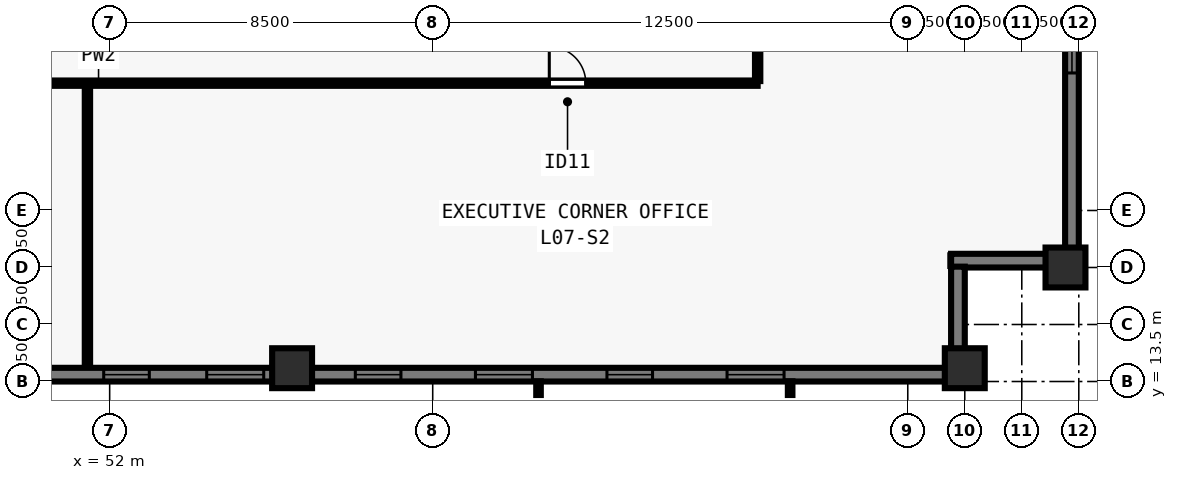
"""IFC4 building model, lengths in metres.
Left out: names, types, materials, properties, quantities, classifications, styles, units other than length and angle.
Written with IfcOpenShell. Run it as: python <this file> out.ifc"""

import sys

from ifc_helpers import new_model, si_unit, direction, frame, frame_2d, origin, origin_2d, place, context, subcontext, project, spatial, rectangle, extrude, element, fill, save


model = new_model("IFC4")
c1 = context("Model", 3, precision=1e-05, world=origin(), true_north=direction((0.0, 1.0)))
c2 = subcontext(c1, "Body", "Model", "MODEL_VIEW")
j1 = project(units=[si_unit("LENGTHUNIT", "METRE"), si_unit("PLANEANGLEUNIT", "RADIAN")], contexts=[c1])
p1 = place(None, origin())
s1 = spatial("IfcSite", under=j1, at=p1, CompositionType="ELEMENT")
p2 = place(p1, origin())
s2 = spatial("IfcBuilding", under=s1, at=p2, CompositionType="ELEMENT")
p3 = place(p2, frame((0.0, 0.0, 30.5)))
s3 = spatial("IfcBuildingStorey", under=s2, at=p3, CompositionType="ELEMENT", Elevation=30.5)
for number, where, z_axis, x_axis in (
    (1, (56.8, 13.85, 0.0), (0.0, 0.0, 1.0), (1.0, 0.0, 0.0)),
    (2, (74.5, 13.85, 0.0), (0.0, 0.0, 1.0), (1.0, 0.0, 0.0)),
    (3, (77.15, 16.5, 0.0), (0.0, 0.0, 1.0), (0.0, 1.0, 0.0)),
):
    element("IfcColumn", number, at=place(p3, frame(where, z_axis=z_axis, x_axis=x_axis)), inside=s3, PredefinedType="COLUMN", context=c2, shape_type="SweptSolid", body=[
        extrude(rectangle(XDim=1.05, YDim=1.05, at=origin_2d()), origin(), (0.0, 0.0, 1.0), 3.5),
    ])
p4 = place(p3, frame((77.32, 61.5, 0.0), z_axis=(0.0, 0.0, 1.0), x_axis=(0.0, -1.0, 0.0)))
e4 = element("IfcWall", 4, at=p4, inside=s3, PredefinedType="SOLIDWALL", context=c2, shape_type="SweptSolid", body=[
    extrude(rectangle(XDim=44.662, YDim=0.36, at=frame_2d((22.331, 0.0))), origin(), (0.0, 0.0, 1.0), 3.28),
])
p5 = place(p4, frame((4.78, 0.0, 0.8)))
e5 = element("IfcOpeningElement", 5, at=p5, cuts=e4, PredefinedType="OPENING", context=c2, shape_type="SweptSolid", body=[
    extrude(rectangle(XDim=1.5, YDim=1.544, at=frame_2d((0.75, 0.772))), frame((0.0, 0.19, 0.0), z_axis=(0.0, -1.0, 0.0), x_axis=(1.0, 0.0, 0.0)), (0.0, 0.0, 1.0), 0.38),
])
p6 = place(p4, frame((8.29, 0.0, 0.8)))
e6 = element("IfcOpeningElement", 6, at=p6, cuts=e4, PredefinedType="OPENING", context=c2, shape_type="SweptSolid", body=[
    extrude(rectangle(XDim=1.2, YDim=1.544, at=frame_2d((0.6, 0.772))), frame((0.0, 0.19, 0.0), z_axis=(0.0, -1.0, 0.0), x_axis=(1.0, 0.0, 0.0)), (0.0, 0.0, 1.0), 0.38),
])
p7 = place(p4, frame((11.5, 0.0, 0.8)))
e7 = element("IfcOpeningElement", 7, at=p7, cuts=e4, PredefinedType="OPENING", context=c2, shape_type="SweptSolid", body=[
    extrude(rectangle(XDim=1.5, YDim=1.544, at=frame_2d((0.75, 0.772))), frame((0.0, 0.19, 0.0), z_axis=(0.0, -1.0, 0.0), x_axis=(1.0, 0.0, 0.0)), (0.0, 0.0, 1.0), 0.38),
])
p8 = place(p4, frame((15.01, 0.0, 0.8)))
e8 = element("IfcOpeningElement", 8, at=p8, cuts=e4, PredefinedType="OPENING", context=c2, shape_type="SweptSolid", body=[
    extrude(rectangle(XDim=1.2, YDim=1.544, at=frame_2d((0.6, 0.772))), frame((0.0, 0.19, 0.0), z_axis=(0.0, -1.0, 0.0), x_axis=(1.0, 0.0, 0.0)), (0.0, 0.0, 1.0), 0.38),
])
p9 = place(p4, frame((18.671, 0.0, 0.8)))
e9 = element("IfcOpeningElement", 9, at=p9, cuts=e4, PredefinedType="OPENING", context=c2, shape_type="SweptSolid", body=[
    extrude(rectangle(XDim=1.5, YDim=1.544, at=frame_2d((0.75, 0.772))), frame((0.0, 0.19, 0.0), z_axis=(0.0, -1.0, 0.0), x_axis=(1.0, 0.0, 0.0)), (0.0, 0.0, 1.0), 0.38),
])
p10 = place(p4, frame((22.581, 0.0, 0.8)))
e10 = element("IfcOpeningElement", 10, at=p10, cuts=e4, PredefinedType="OPENING", context=c2, shape_type="SweptSolid", body=[
    extrude(rectangle(XDim=1.2, YDim=1.544, at=frame_2d((0.6, 0.772))), frame((0.0, 0.19, 0.0), z_axis=(0.0, -1.0, 0.0), x_axis=(1.0, 0.0, 0.0)), (0.0, 0.0, 1.0), 0.38),
])
p11 = place(p4, frame((24.941, 0.0, 0.8)))
e11 = element("IfcOpeningElement", 11, at=p11, cuts=e4, PredefinedType="OPENING", context=c2, shape_type="SweptSolid", body=[
    extrude(rectangle(XDim=1.5, YDim=1.544, at=frame_2d((0.75, 0.772))), frame((0.0, 0.19, 0.0), z_axis=(0.0, -1.0, 0.0), x_axis=(1.0, 0.0, 0.0)), (0.0, 0.0, 1.0), 0.38),
])
p12 = place(p4, frame((28.451, 0.0, 0.8)))
e12 = element("IfcOpeningElement", 12, at=p12, cuts=e4, PredefinedType="OPENING", context=c2, shape_type="SweptSolid", body=[
    extrude(rectangle(XDim=1.2, YDim=1.544, at=frame_2d((0.6, 0.772))), frame((0.0, 0.19, 0.0), z_axis=(0.0, -1.0, 0.0), x_axis=(1.0, 0.0, 0.0)), (0.0, 0.0, 1.0), 0.38),
])
p13 = place(p4, frame((31.662, 0.0, 0.8)))
e13 = element("IfcOpeningElement", 13, at=p13, cuts=e4, PredefinedType="OPENING", context=c2, shape_type="SweptSolid", body=[
    extrude(rectangle(XDim=1.5, YDim=1.544, at=frame_2d((0.75, 0.772))), frame((0.0, 0.19, 0.0), z_axis=(0.0, -1.0, 0.0), x_axis=(1.0, 0.0, 0.0)), (0.0, 0.0, 1.0), 0.38),
])
p14 = place(p4, frame((35.172, 0.0, 0.8)))
e14 = element("IfcOpeningElement", 14, at=p14, cuts=e4, PredefinedType="OPENING", context=c2, shape_type="SweptSolid", body=[
    extrude(rectangle(XDim=1.2, YDim=1.544, at=frame_2d((0.6, 0.772))), frame((0.0, 0.19, 0.0), z_axis=(0.0, -1.0, 0.0), x_axis=(1.0, 0.0, 0.0)), (0.0, 0.0, 1.0), 0.38),
])
p15 = place(p4, frame((38.382, 0.0, 0.8)))
e15 = element("IfcOpeningElement", 15, at=p15, cuts=e4, PredefinedType="OPENING", context=c2, shape_type="SweptSolid", body=[
    extrude(rectangle(XDim=1.5, YDim=1.544, at=frame_2d((0.75, 0.772))), frame((0.0, 0.19, 0.0), z_axis=(0.0, -1.0, 0.0), x_axis=(1.0, 0.0, 0.0)), (0.0, 0.0, 1.0), 0.38),
])
p16 = place(p3, frame((77.5, 16.68, 0.0), z_axis=(0.0, 0.0, 1.0), x_axis=(-1.0, 0.0, 0.0)))
e16 = element("IfcWall", 16, at=p16, inside=s3, PredefinedType="SOLIDWALL", context=c2, shape_type="SweptSolid", body=[
    extrude(rectangle(XDim=3.36, YDim=0.36, at=frame_2d((1.68, 0.0))), origin(), (0.0, 0.0, 1.0), 3.28),
])
p17 = place(p3, frame((74.32, 16.522, 0.0), z_axis=(0.0, 0.0, 1.0), x_axis=(0.0, -1.0, 0.0)))
e17 = element("IfcWall", 17, at=p17, inside=s3, PredefinedType="SOLIDWALL", context=c2, shape_type="SweptSolid", body=[
    extrude(rectangle(XDim=2.684, YDim=0.36, at=frame_2d((1.342, 0.0))), origin(), (0.0, 0.0, 1.0), 3.28),
])
p18 = place(p3, frame((74.5, 13.68, 0.0), z_axis=(0.0, 0.0, 1.0), x_axis=(-1.0, 0.0, 0.0)))
e18 = element("IfcWall", 18, at=p18, inside=s3, PredefinedType="SOLIDWALL", context=c2, shape_type="SweptSolid", body=[
    extrude(rectangle(XDim=27.562, YDim=0.36, at=frame_2d((13.781, 0.0))), origin(), (0.0, 0.0, 1.0), 3.28),
])
p19 = place(p18, frame((4.755, 0.0, 0.8)))
e19 = element("IfcOpeningElement", 19, at=p19, cuts=e18, PredefinedType="OPENING", context=c2, shape_type="SweptSolid", body=[
    extrude(rectangle(XDim=1.5, YDim=1.544, at=frame_2d((0.75, 0.772))), frame((0.0, 0.19, 0.0), z_axis=(0.0, -1.0, 0.0), x_axis=(1.0, 0.0, 0.0)), (0.0, 0.0, 1.0), 0.38),
])
p20 = place(p18, frame((8.216, 0.0, 0.8)))
e20 = element("IfcOpeningElement", 20, at=p20, cuts=e18, PredefinedType="OPENING", context=c2, shape_type="SweptSolid", body=[
    extrude(rectangle(XDim=1.2, YDim=1.544, at=frame_2d((0.6, 0.772))), frame((0.0, 0.19, 0.0), z_axis=(0.0, -1.0, 0.0), x_axis=(1.0, 0.0, 0.0)), (0.0, 0.0, 1.0), 0.38),
])
p21 = place(p18, frame((11.376, 0.0, 0.8)))
e21 = element("IfcOpeningElement", 21, at=p21, cuts=e18, PredefinedType="OPENING", context=c2, shape_type="SweptSolid", body=[
    extrude(rectangle(XDim=1.5, YDim=1.544, at=frame_2d((0.75, 0.772))), frame((0.0, 0.19, 0.0), z_axis=(0.0, -1.0, 0.0), x_axis=(1.0, 0.0, 0.0)), (0.0, 0.0, 1.0), 0.38),
])
p22 = place(p18, frame((14.836, 0.0, 0.8)))
e22 = element("IfcOpeningElement", 22, at=p22, cuts=e18, PredefinedType="OPENING", context=c2, shape_type="SweptSolid", body=[
    extrude(rectangle(XDim=1.2, YDim=1.544, at=frame_2d((0.6, 0.772))), frame((0.0, 0.19, 0.0), z_axis=(0.0, -1.0, 0.0), x_axis=(1.0, 0.0, 0.0)), (0.0, 0.0, 1.0), 0.38),
])
p23 = place(p18, frame((18.447, 0.0, 0.8)))
e23 = element("IfcOpeningElement", 23, at=p23, cuts=e18, PredefinedType="OPENING", context=c2, shape_type="SweptSolid", body=[
    extrude(rectangle(XDim=1.5, YDim=1.544, at=frame_2d((0.75, 0.772))), frame((0.0, 0.19, 0.0), z_axis=(0.0, -1.0, 0.0), x_axis=(1.0, 0.0, 0.0)), (0.0, 0.0, 1.0), 0.38),
])
p24 = place(p18, frame((21.457, 0.0, 0.8)))
e24 = element("IfcOpeningElement", 24, at=p24, cuts=e18, PredefinedType="OPENING", context=c2, shape_type="SweptSolid", body=[
    extrude(rectangle(XDim=1.2, YDim=1.544, at=frame_2d((0.6, 0.772))), frame((0.0, 0.19, 0.0), z_axis=(0.0, -1.0, 0.0), x_axis=(1.0, 0.0, 0.0)), (0.0, 0.0, 1.0), 0.38),
])
p25 = place(p3, frame((34.95, 21.35, 0.0), z_axis=(0.0, 0.0, 1.0), x_axis=(1.0, 0.0, 0.0)))
e25 = element("IfcWall", 25, at=p25, inside=s3, PredefinedType="PARTITIONING", context=c2, shape_type="SweptSolid", body=[
    extrude(rectangle(XDim=34.1, YDim=0.14, at=frame_2d((17.05, 0.0))), origin(), (0.0, 0.0, 1.0), 3.28),
])
p26 = place(p25, frame((3.938, 0.0, 0.0)))
e26 = element("IfcOpeningElement", 26, at=p26, cuts=e25, PredefinedType="OPENING", context=c2, shape_type="SweptSolid", body=[
    extrude(rectangle(XDim=0.96, YDim=2.12, at=frame_2d((0.48, 1.06))), frame((0.0, 0.08, 0.0), z_axis=(0.0, -1.0, 0.0), x_axis=(1.0, 0.0, 0.0)), (0.0, 0.0, 1.0), 0.16),
])
p27 = place(p25, frame((28.617, 0.0, 0.0)))
e27 = element("IfcOpeningElement", 27, at=p27, cuts=e25, PredefinedType="OPENING", context=c2, shape_type="SweptSolid", body=[
    extrude(rectangle(XDim=0.96, YDim=2.12, at=frame_2d((0.48, 1.06))), frame((0.0, 0.08, 0.0), z_axis=(0.0, -1.0, 0.0), x_axis=(1.0, 0.0, 0.0)), (0.0, 0.0, 1.0), 0.16),
])
p28 = place(p3, frame((69.05, 21.405, 0.0), z_axis=(0.0, 0.0, 1.0), x_axis=(0.0, 1.0, 0.0)))
e28 = element("IfcWall", 28, at=p28, inside=s3, PredefinedType="PARTITIONING", context=c2, shape_type="SweptSolid", body=[
    extrude(rectangle(XDim=35.19, YDim=0.14, at=frame_2d((17.595, 0.0))), origin(), (0.0, 0.0, 1.0), 3.28),
])
p29 = place(p28, frame((8.545, 0.0, 0.0)))
e29 = element("IfcOpeningElement", 29, at=p29, cuts=e28, PredefinedType="OPENING", context=c2, shape_type="SweptSolid", body=[
    extrude(rectangle(XDim=0.96, YDim=2.12, at=frame_2d((0.48, 1.06))), frame((0.0, 0.08, 0.0), z_axis=(0.0, -1.0, 0.0), x_axis=(1.0, 0.0, 0.0)), (0.0, 0.0, 1.0), 0.16),
])
p30 = place(p28, frame((26.095, 0.0, 0.0)))
e30 = element("IfcOpeningElement", 30, at=p30, cuts=e28, PredefinedType="OPENING", context=c2, shape_type="SweptSolid", body=[
    extrude(rectangle(XDim=0.96, YDim=2.12, at=frame_2d((0.48, 1.06))), frame((0.0, 0.08, 0.0), z_axis=(0.0, -1.0, 0.0), x_axis=(1.0, 0.0, 0.0)), (0.0, 0.0, 1.0), 0.16),
])
p31 = place(p3, frame((51.415, 13.92, 0.0), z_axis=(0.0, 0.0, 1.0), x_axis=(0.0, 1.0, 0.0)))
e31 = element("IfcWall", 31, at=p31, inside=s3, PredefinedType="PARTITIONING", context=c2, shape_type="SweptSolid", body=[
    extrude(rectangle(XDim=7.33, YDim=0.14, at=frame_2d((3.665, 0.0))), origin(), (0.0, 0.0, 1.0), 2.849),
])
p32 = place(p15, origin())
e32 = element("IfcWindow", 32, at=p32, inside=s3, PartitioningType="SINGLE_PANEL", PredefinedType="WINDOW", context=c2, shape_type="SweptSolid", body=[
    extrude(rectangle(XDim=1.5, YDim=1.544, at=frame_2d((0.75, 0.772))), frame((0.0, -0.05, 0.0), z_axis=(0.0, -1.0, 0.0), x_axis=(1.0, 0.0, 0.0)), (0.0, 0.0, 1.0), 0.06),
])
fill(e15, e32)
p33 = place(p19, origin())
e33 = element("IfcWindow", 33, at=p33, inside=s3, PartitioningType="SINGLE_PANEL", PredefinedType="WINDOW", context=c2, shape_type="SweptSolid", body=[
    extrude(rectangle(XDim=1.5, YDim=1.544, at=frame_2d((0.75, 0.772))), frame((0.0, -0.05, 0.0), z_axis=(0.0, -1.0, 0.0), x_axis=(1.0, 0.0, 0.0)), (0.0, 0.0, 1.0), 0.06),
])
fill(e19, e33)
p34 = place(p20, origin())
e34 = element("IfcWindow", 34, at=p34, inside=s3, PartitioningType="SINGLE_PANEL", PredefinedType="WINDOW", context=c2, shape_type="SweptSolid", body=[
    extrude(rectangle(XDim=1.2, YDim=1.544, at=frame_2d((0.6, 0.772))), frame((0.0, -0.05, 0.0), z_axis=(0.0, -1.0, 0.0), x_axis=(1.0, 0.0, 0.0)), (0.0, 0.0, 1.0), 0.06),
])
fill(e20, e34)
p35 = place(p21, origin())
e35 = element("IfcWindow", 35, at=p35, inside=s3, PartitioningType="SINGLE_PANEL", PredefinedType="WINDOW", context=c2, shape_type="SweptSolid", body=[
    extrude(rectangle(XDim=1.5, YDim=1.544, at=frame_2d((0.75, 0.772))), frame((0.0, -0.05, 0.0), z_axis=(0.0, -1.0, 0.0), x_axis=(1.0, 0.0, 0.0)), (0.0, 0.0, 1.0), 0.06),
])
fill(e21, e35)
p36 = place(p22, origin())
e36 = element("IfcWindow", 36, at=p36, inside=s3, PartitioningType="SINGLE_PANEL", PredefinedType="WINDOW", context=c2, shape_type="SweptSolid", body=[
    extrude(rectangle(XDim=1.2, YDim=1.544, at=frame_2d((0.6, 0.772))), frame((0.0, -0.05, 0.0), z_axis=(0.0, -1.0, 0.0), x_axis=(1.0, 0.0, 0.0)), (0.0, 0.0, 1.0), 0.06),
])
fill(e22, e36)
p37 = place(p23, origin())
e37 = element("IfcWindow", 37, at=p37, inside=s3, PartitioningType="SINGLE_PANEL", PredefinedType="WINDOW", context=c2, shape_type="SweptSolid", body=[
    extrude(rectangle(XDim=1.5, YDim=1.544, at=frame_2d((0.75, 0.772))), frame((0.0, -0.05, 0.0), z_axis=(0.0, -1.0, 0.0), x_axis=(1.0, 0.0, 0.0)), (0.0, 0.0, 1.0), 0.06),
])
fill(e23, e37)
p38 = place(p24, origin())
e38 = element("IfcWindow", 38, at=p38, inside=s3, PartitioningType="SINGLE_PANEL", PredefinedType="WINDOW", context=c2, shape_type="SweptSolid", body=[
    extrude(rectangle(XDim=1.2, YDim=1.544, at=frame_2d((0.6, 0.772))), frame((0.0, -0.05, 0.0), z_axis=(0.0, -1.0, 0.0), x_axis=(1.0, 0.0, 0.0)), (0.0, 0.0, 1.0), 0.06),
])
fill(e24, e38)
p39 = place(p27, origin())
e39 = element("IfcDoor", 39, at=p39, inside=s3, OperationType="SINGLE_SWING_LEFT", PredefinedType="DOOR", context=c2, shape_type="SweptSolid", body=[
    extrude(rectangle(XDim=0.96, YDim=2.12, at=frame_2d((0.48, 1.06))), frame((0.0, 0.025, 0.0), z_axis=(0.0, -1.0, 0.0), x_axis=(1.0, 0.0, 0.0)), (0.0, 0.0, 1.0), 0.05),
])
fill(e27, e39)
save(model, sys.argv[1])
